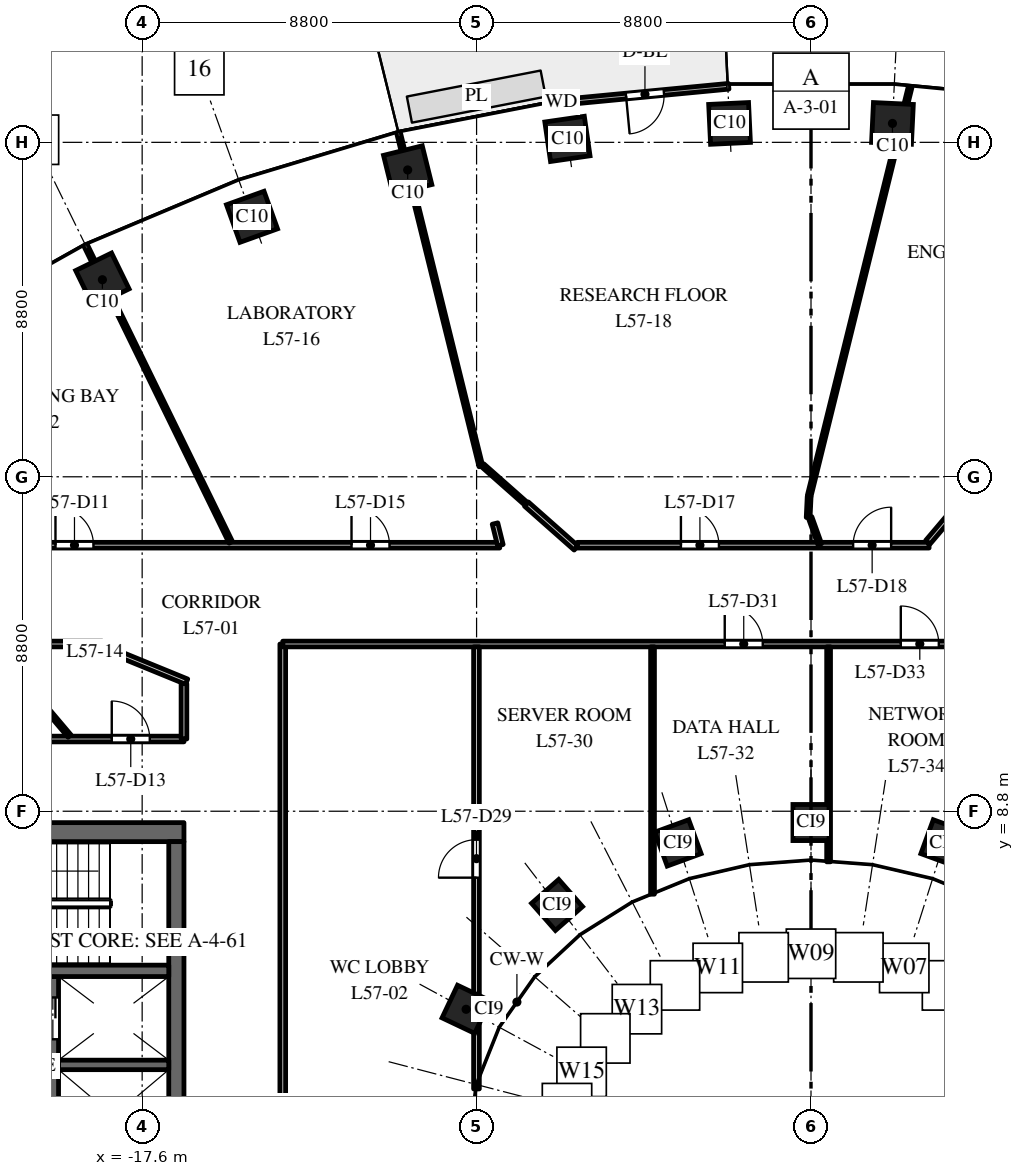
"""IFC4 building model, lengths in metres.
Left out: names, types, materials, properties, quantities, classifications, styles, units other than length and angle.
Written with IfcOpenShell. Run it as: python <this file> out.ifc"""

import sys

from ifc_helpers import new_model, si_unit, direction, frame, frame_2d, origin, origin_2d, place, context, subcontext, project, spatial, rectangle, extrude, element, fill, save


model = new_model("IFC4")
c1 = context("Model", 3, precision=1e-05, world=origin(), true_north=direction((0.0, 1.0)))
c2 = subcontext(c1, "Body", "Model", "MODEL_VIEW")
j1 = project(units=[si_unit("LENGTHUNIT", "METRE"), si_unit("PLANEANGLEUNIT", "RADIAN")], contexts=[c1])
p1 = place(None, origin())
s1 = spatial("IfcSite", under=j1, at=p1, CompositionType="ELEMENT")
p2 = place(p1, origin())
s2 = spatial("IfcBuilding", under=s1, at=p2, CompositionType="ELEMENT")
p3 = place(p2, frame((0.0, 0.0, 269.5)))
s3 = spatial("IfcBuildingStorey", under=s2, at=p3, CompositionType="ELEMENT", Elevation=269.5)
for number, where, z_axis, x_axis in (
    (1, (2.143, 26.898, 0.0), (0.0, 0.0, 1.0), (-0.999, 0.048, 0.0)),
    (2, (-2.143, 26.898, 0.0), (0.0, 0.0, 1.0), (-0.999, -0.048, 0.0)),
    (3, (-6.409, 26.491, 0.0), (0.0, 0.0, 1.0), (-0.99, -0.143, 0.0)),
    (4, (-10.613, 25.674, 0.0), (0.0, 0.0, 1.0), (-0.971, -0.24, 0.0)),
    (5, (-14.709, 24.441, 0.0), (0.0, 0.0, 1.0), (-0.941, -0.338, 0.0)),
    (6, (-18.646, 22.785, 0.0), (0.0, 0.0, 1.0), (-0.898, -0.439, 0.0)),
):
    element("IfcColumn", number, at=place(p3, frame(where, z_axis=z_axis, x_axis=x_axis)), inside=s3, PredefinedType="COLUMN", context=c2, shape_type="SweptSolid", body=[
        extrude(rectangle(XDim=1.05, YDim=1.05, at=origin_2d()), origin(), (0.0, 0.0, 1.0), 4.0),
    ])
for number, where, z_axis, x_axis in (
    (7, (3.501, 7.967, 0.0), (0.0, 0.0, 1.0), (-0.939, 0.344, 0.0)),
    (8, (0.0, 8.503, 0.0), (0.0, 0.0, 1.0), (-1.0, 0.0, 0.0)),
    (9, (-3.501, 7.967, 0.0), (0.0, 0.0, 1.0), (-0.939, -0.344, 0.0)),
    (10, (-6.682, 6.334, 0.0), (0.0, 0.0, 1.0), (-0.751, -0.66, 0.0)),
    (11, (-9.076, 3.588, 0.0), (0.0, 0.0, 1.0), (-0.429, -0.903, 0.0)),
):
    element("IfcColumn", number, at=place(p3, frame(where, z_axis=z_axis, x_axis=x_axis)), inside=s3, PredefinedType="COLUMN", context=c2, shape_type="SweptSolid", body=[
        extrude(rectangle(XDim=0.95, YDim=0.95, at=origin_2d()), origin(), (0.0, 0.0, 1.0), 4.0),
    ])
p4 = place(p3, frame((-16.5, 8.25, 0.0), z_axis=(0.0, 0.0, 1.0), x_axis=(-1.0, 0.0, 0.0)))
e12 = element("IfcWall", 12, at=p4, inside=s3, PredefinedType="SHEAR", context=c2, shape_type="SweptSolid", body=[
    extrude(rectangle(XDim=15.0, YDim=0.5, at=frame_2d((7.5, 0.0))), origin(), (0.0, 0.0, 1.0), 3.7),
])
p5 = place(p4, frame((6.9, 0.0, 0.0)))
e13 = element("IfcOpeningElement", 13, at=p5, cuts=e12, PredefinedType="OPENING", context=c2, shape_type="SweptSolid", body=[
    extrude(rectangle(XDim=1.2, YDim=2.1, at=frame_2d((0.6, 1.05))), frame((0.0, 0.26, 0.0), z_axis=(0.0, -1.0, 0.0), x_axis=(1.0, 0.0, 0.0)), (0.0, 0.0, 1.0), 0.52),
])
p6 = place(p4, frame((12.95, 0.0, 0.0)))
e14 = element("IfcOpeningElement", 14, at=p6, cuts=e12, PredefinedType="OPENING", context=c2, shape_type="SweptSolid", body=[
    extrude(rectangle(XDim=0.9, YDim=2.1, at=frame_2d((0.45, 1.05))), frame((0.0, 0.26, 0.0), z_axis=(0.0, -1.0, 0.0), x_axis=(1.0, 0.0, 0.0)), (0.0, 0.0, 1.0), 0.52),
])
p7 = place(p3, frame((-19.95, -4.45, 0.0), z_axis=(0.0, 0.0, 1.0), x_axis=(0.0, 1.0, 0.0)))
e15 = element("IfcWall", 15, at=p7, inside=s3, PredefinedType="SHEAR", context=c2, shape_type="SweptSolid", body=[
    extrude(rectangle(XDim=8.9, YDim=0.3, at=frame_2d((4.45, 0.0))), origin(), (0.0, 0.0, 1.0), 3.7),
])
p8 = place(p7, frame((0.775, 0.0, 0.0)))
e16 = element("IfcOpeningElement", 16, at=p8, cuts=e15, PredefinedType="OPENING", context=c2, shape_type="SweptSolid", body=[
    extrude(rectangle(XDim=1.2, YDim=2.1, at=frame_2d((0.6, 1.05))), frame((0.0, 0.16, 0.0), z_axis=(0.0, -1.0, 0.0), x_axis=(1.0, 0.0, 0.0)), (0.0, 0.0, 1.0), 0.32),
])
p9 = place(p7, frame((7.25, 0.0, 0.0)))
e17 = element("IfcOpeningElement", 17, at=p9, cuts=e15, PredefinedType="OPENING", context=c2, shape_type="SweptSolid", body=[
    extrude(rectangle(XDim=1.1, YDim=2.1, at=frame_2d((0.55, 1.05))), frame((0.0, 0.16, 0.0), z_axis=(0.0, -1.0, 0.0), x_axis=(1.0, 0.0, 0.0)), (0.0, 0.0, 1.0), 0.32),
])
p10 = place(p3, frame((-16.7, -8.0, 0.0), z_axis=(0.0, 0.0, 1.0), x_axis=(0.0, 1.0, 0.0)))
e18 = element("IfcWall", 18, at=p10, inside=s3, PredefinedType="SHEAR", context=c2, shape_type="SweptSolid", body=[
    extrude(rectangle(XDim=16.0, YDim=0.4, at=frame_2d((8.0, 0.0))), origin(), (0.0, 0.0, 1.0), 3.7),
])
p11 = place(p3, frame((-16.9, 2.125, 0.0), z_axis=(0.0, 0.0, 1.0), x_axis=(-1.0, 0.0, 0.0)))
e19 = element("IfcWall", 19, at=p11, inside=s3, PredefinedType="SHEAR", context=c2, shape_type="SweptSolid", body=[
    extrude(rectangle(XDim=2.9, YDim=0.25, at=frame_2d((1.45, 0.0))), origin(), (0.0, 0.0, 1.0), 3.7),
])
p12 = place(p3, frame((-16.9, 4.6, 0.0), z_axis=(0.0, 0.0, 1.0), x_axis=(-1.0, 0.0, 0.0)))
e20 = element("IfcWall", 20, at=p12, inside=s3, PredefinedType="SHEAR", context=c2, shape_type="SweptSolid", body=[
    extrude(rectangle(XDim=6.18, YDim=0.3, at=frame_2d((3.09, 0.0))), origin(), (0.0, 0.0, 1.0), 3.7),
])
p13 = place(p12, frame((4.9, 0.0, 0.0)))
e21 = element("IfcOpeningElement", 21, at=p13, cuts=e20, PredefinedType="OPENING", context=c2, shape_type="SweptSolid", body=[
    extrude(rectangle(XDim=1.1, YDim=2.1, at=frame_2d((0.55, 1.05))), frame((0.0, 0.16, 0.0), z_axis=(0.0, -1.0, 0.0), x_axis=(1.0, 0.0, 0.0)), (0.0, 0.0, 1.0), 0.32),
])
p14 = place(p3, frame((-2.166, 27.875, 0.0), z_axis=(0.0, 0.0, 1.0), x_axis=(-0.995473879823, -0.095035543824, 0.0)))
e22 = element("IfcWall", 22, at=p14, inside=s3, PredefinedType="STANDARD", context=c2, shape_type="SweptSolid", body=[
    extrude(rectangle(XDim=4.426, YDim=0.15, at=frame_2d((2.213, 0.0))), origin(), (0.0, 0.0, 1.0), 3.7),
])
p15 = place(p14, frame((1.713, 0.0, 0.0)))
e23 = element("IfcOpeningElement", 23, at=p15, cuts=e22, PredefinedType="OPENING", context=c2, shape_type="SweptSolid", body=[
    extrude(rectangle(XDim=1.0, YDim=2.4, at=frame_2d((0.5, 1.2))), frame((0.0, 0.085, 0.0), z_axis=(0.0, -1.0, 0.0), x_axis=(1.0, 0.0, 0.0)), (0.0, 0.0, 1.0), 0.17),
])
p16 = place(p3, frame((-31.5, 10.7, 0.0), z_axis=(0.0, 0.0, 1.0), x_axis=(1.0, 0.0, 0.0)))
e24 = element("IfcWall", 24, at=p16, inside=s3, PredefinedType="PARTITIONING", context=c2, shape_type="SweptSolid", body=[
    extrude(rectangle(XDim=15.0, YDim=0.15, at=frame_2d((7.5, 0.0))), origin(), (0.0, 0.0, 1.0), 3.1),
])
p17 = place(p16, frame((6.405, 0.0, 0.0)))
e25 = element("IfcOpeningElement", 25, at=p17, cuts=e24, PredefinedType="OPENING", context=c2, shape_type="SweptSolid", body=[
    extrude(rectangle(XDim=1.0, YDim=2.1, at=frame_2d((0.5, 1.05))), frame((0.0, 0.085, 0.0), z_axis=(0.0, -1.0, 0.0), x_axis=(1.0, 0.0, 0.0)), (0.0, 0.0, 1.0), 0.17),
])
p18 = place(p16, frame((13.1, 0.0, 0.0)))
e26 = element("IfcOpeningElement", 26, at=p18, cuts=e24, PredefinedType="OPENING", context=c2, shape_type="SweptSolid", body=[
    extrude(rectangle(XDim=1.0, YDim=2.1, at=frame_2d((0.5, 1.05))), frame((0.0, 0.085, 0.0), z_axis=(0.0, -1.0, 0.0), x_axis=(1.0, 0.0, 0.0)), (0.0, 0.0, 1.0), 0.17),
])
p19 = place(p3, frame((-28.0, 13.2, 0.0), z_axis=(0.0, 0.0, 1.0), x_axis=(1.0, 0.0, 0.0)))
e27 = element("IfcWall", 27, at=p19, inside=s3, PredefinedType="PARTITIONING", context=c2, shape_type="SweptSolid", body=[
    extrude(rectangle(XDim=9.347, YDim=0.15, at=frame_2d((4.673, 0.0))), origin(), (0.0, 0.0, 1.0), 2.75),
])
p20 = place(p3, frame((-28.0, 15.8, 0.0), z_axis=(0.0, 0.0, 1.0), x_axis=(1.0, 0.0, 0.0)))
e28 = element("IfcWall", 28, at=p20, inside=s3, PredefinedType="PARTITIONING", context=c2, shape_type="SweptSolid", body=[
    extrude(rectangle(XDim=19.809, YDim=0.15, at=frame_2d((9.905, 0.0))), origin(), (0.0, 0.0, 1.0), 2.75),
])
p21 = place(p20, frame((8.119, 0.0, 0.0)))
e29 = element("IfcOpeningElement", 29, at=p21, cuts=e28, PredefinedType="OPENING", context=c2, shape_type="SweptSolid", body=[
    extrude(rectangle(XDim=1.0, YDim=2.1, at=frame_2d((0.5, 1.05))), frame((0.0, 0.085, 0.0), z_axis=(0.0, -1.0, 0.0), x_axis=(1.0, 0.0, 0.0)), (0.0, 0.0, 1.0), 0.17),
])
p22 = place(p20, frame((15.909, 0.0, 0.0)))
e30 = element("IfcOpeningElement", 30, at=p22, cuts=e28, PredefinedType="OPENING", context=c2, shape_type="SweptSolid", body=[
    extrude(rectangle(XDim=1.0, YDim=2.1, at=frame_2d((0.5, 1.05))), frame((0.0, 0.085, 0.0), z_axis=(0.0, -1.0, 0.0), x_axis=(1.0, 0.0, 0.0)), (0.0, 0.0, 1.0), 0.17),
])
p23 = place(p3, frame((-21.499, 13.125, 0.0), z_axis=(0.0, 0.0, 1.0), x_axis=(0.646354899778, -0.763036921474, 0.0)))
e31 = element("IfcWall", 31, at=p23, inside=s3, PredefinedType="PARTITIONING", context=c2, shape_type="SweptSolid", body=[
    extrude(rectangle(XDim=3.076, YDim=0.1, at=frame_2d((1.538, 0.0))), origin(), (0.0, 0.0, 1.0), 3.7),
])
p24 = place(p3, frame((-19.086, 23.685, 0.0), z_axis=(0.0, 0.0, 1.0), x_axis=(0.439174872977, -0.898401597809, 0.0)))
e32 = element("IfcWall", 32, at=p24, inside=s3, PredefinedType="PARTITIONING", context=c2, shape_type="SweptSolid", body=[
    extrude(rectangle(XDim=8.693, YDim=0.1, at=frame_2d((4.347, 0.0))), origin(), (0.0, 0.0, 1.0), 2.85),
])
p25 = place(p3, frame((-18.664, 13.123, 0.0), z_axis=(0.0, 0.0, 1.0), x_axis=(0.925590432986, -0.378526551731, 0.0)))
e33 = element("IfcWall", 33, at=p25, inside=s3, PredefinedType="PARTITIONING", context=c2, shape_type="SweptSolid", body=[
    extrude(rectangle(XDim=2.415, YDim=0.15, at=frame_2d((1.208, 0.0))), origin(), (0.0, 0.0, 1.0), 2.75),
])
p26 = place(p3, frame((-16.5, 10.7, 0.0), z_axis=(0.0, 0.0, 1.0), x_axis=(0.0, 1.0, 0.0)))
e34 = element("IfcWall", 34, at=p26, inside=s3, PredefinedType="PARTITIONING", context=c2, shape_type="SweptSolid", body=[
    extrude(rectangle(XDim=1.457, YDim=0.15, at=frame_2d((0.729, 0.0))), origin(), (0.0, 0.0, 1.0), 2.75),
])
p27 = place(p3, frame((-13.9, -13.2, 0.0), z_axis=(0.0, 0.0, 1.0), x_axis=(0.0, 1.0, 0.0)))
e35 = element("IfcWall", 35, at=p27, inside=s3, PredefinedType="PARTITIONING", context=c2, shape_type="SweptSolid", body=[
    extrude(rectangle(XDim=26.4, YDim=0.15, at=frame_2d((13.2, 0.0))), origin(), (0.0, 0.0, 1.0), 2.75),
])
p28 = place(p27, frame((12.65, 0.0, 0.0)))
e36 = element("IfcOpeningElement", 36, at=p28, cuts=e35, PredefinedType="OPENING", context=c2, shape_type="SweptSolid", body=[
    extrude(rectangle(XDim=1.0, YDim=2.1, at=frame_2d((0.5, 1.05))), frame((0.0, 0.085, 0.0), z_axis=(0.0, -1.0, 0.0), x_axis=(1.0, 0.0, 0.0)), (0.0, 0.0, 1.0), 0.17),
])
p29 = place(p3, frame((-13.9, 13.2, 0.0), z_axis=(0.0, 0.0, 1.0), x_axis=(1.0, 0.0, 0.0)))
e37 = element("IfcWall", 37, at=p29, inside=s3, PredefinedType="PARTITIONING", context=c2, shape_type="SweptSolid", body=[
    extrude(rectangle(XDim=27.8, YDim=0.15, at=frame_2d((13.9, 0.0))), origin(), (0.0, 0.0, 1.0), 2.85),
])
p30 = place(p29, frame((11.63, 0.0, 0.0)))
e38 = element("IfcOpeningElement", 38, at=p30, cuts=e37, PredefinedType="OPENING", context=c2, shape_type="SweptSolid", body=[
    extrude(rectangle(XDim=1.0, YDim=2.1, at=frame_2d((0.5, 1.05))), frame((0.0, 0.085, 0.0), z_axis=(0.0, -1.0, 0.0), x_axis=(1.0, 0.0, 0.0)), (0.0, 0.0, 1.0), 0.17),
])
p31 = place(p29, frame((16.263, 0.0, 0.0)))
e39 = element("IfcOpeningElement", 39, at=p31, cuts=e37, PredefinedType="OPENING", context=c2, shape_type="SweptSolid", body=[
    extrude(rectangle(XDim=1.0, YDim=2.1, at=frame_2d((0.5, 1.05))), frame((0.0, 0.085, 0.0), z_axis=(0.0, -1.0, 0.0), x_axis=(1.0, 0.0, 0.0)), (0.0, 0.0, 1.0), 0.17),
])
p32 = place(p29, frame((20.897, 0.0, 0.0)))
e40 = element("IfcOpeningElement", 40, at=p32, cuts=e37, PredefinedType="OPENING", context=c2, shape_type="SweptSolid", body=[
    extrude(rectangle(XDim=1.0, YDim=2.1, at=frame_2d((0.5, 1.05))), frame((0.0, 0.085, 0.0), z_axis=(0.0, -1.0, 0.0), x_axis=(1.0, 0.0, 0.0)), (0.0, 0.0, 1.0), 0.17),
])
p33 = place(p3, frame((-10.853, 26.646, 0.0), z_axis=(0.0, 0.0, 1.0), x_axis=(0.239774810524, -0.970828532872, 0.0)))
e41 = element("IfcWall", 41, at=p33, inside=s3, PredefinedType="PARTITIONING", context=c2, shape_type="SweptSolid", body=[
    extrude(rectangle(XDim=9.033, YDim=0.1, at=frame_2d((4.517, 0.0))), origin(), (0.0, 0.0, 1.0), 2.85),
])
p34 = place(p3, frame((-8.803, 1.493, 0.0), z_axis=(0.0, 0.0, 1.0), x_axis=(0.0, 1.0, 0.0)))
e42 = element("IfcWall", 42, at=p34, inside=s3, PredefinedType="PARTITIONING", context=c2, shape_type="SweptSolid", body=[
    extrude(rectangle(XDim=11.632, YDim=0.15, at=frame_2d((5.816, 0.0))), origin(), (0.0, 0.0, 1.0), 2.75),
])
p35 = place(p34, frame((5.559, 0.0, 0.0)))
e43 = element("IfcOpeningElement", 43, at=p35, cuts=e42, PredefinedType="OPENING", context=c2, shape_type="SweptSolid", body=[
    extrude(rectangle(XDim=1.0, YDim=2.1, at=frame_2d((0.5, 1.05))), frame((0.0, 0.085, 0.0), z_axis=(0.0, -1.0, 0.0), x_axis=(1.0, 0.0, 0.0)), (0.0, 0.0, 1.0), 0.17),
])
p36 = place(p3, frame((-8.642, 17.903, 0.0), z_axis=(0.0, 0.0, 1.0), x_axis=(0.748963294947, -0.662611487089, 0.0)))
e44 = element("IfcWall", 44, at=p36, inside=s3, PredefinedType="PARTITIONING", context=c2, shape_type="SweptSolid", body=[
    extrude(rectangle(XDim=1.541, YDim=0.1, at=frame_2d((0.771, 0.0))), origin(), (0.0, 0.0, 1.0), 3.7),
])
p37 = place(p3, frame((-8.315, 16.37, 0.0), z_axis=(0.0, 0.0, 1.0), x_axis=(0.239893428325, -0.97079922901, 0.0)))
e45 = element("IfcWall", 45, at=p37, inside=s3, PredefinedType="PARTITIONING", context=c2, shape_type="SweptSolid", body=[
    extrude(rectangle(XDim=0.587, YDim=0.15, at=frame_2d((0.293, 0.0))), origin(), (0.0, 0.0, 1.0), 3.7),
])
p38 = place(p3, frame((-7.488, 16.882, 0.0), z_axis=(0.0, 0.0, 1.0), x_axis=(0.749084830903, -0.662474087124, 0.0)))
e46 = element("IfcWall", 46, at=p38, inside=s3, PredefinedType="PARTITIONING", context=c2, shape_type="SweptSolid", body=[
    extrude(rectangle(XDim=1.742, YDim=0.15, at=frame_2d((0.871, 0.0))), origin(), (0.0, 0.0, 1.0), 2.85),
])
p39 = place(p3, frame((-6.152, 15.8, 0.0), z_axis=(0.0, 0.0, 1.0), x_axis=(1.0, 0.0, 0.0)))
e47 = element("IfcWall", 47, at=p39, inside=s3, PredefinedType="PARTITIONING", context=c2, shape_type="SweptSolid", body=[
    extrude(rectangle(XDim=9.259, YDim=0.15, at=frame_2d((4.629, 0.0))), origin(), (0.0, 0.0, 1.0), 2.85),
])
p40 = place(p39, frame((2.729, 0.0, 0.0)))
e48 = element("IfcOpeningElement", 48, at=p40, cuts=e47, PredefinedType="OPENING", context=c2, shape_type="SweptSolid", body=[
    extrude(rectangle(XDim=1.0, YDim=2.1, at=frame_2d((0.5, 1.05))), frame((0.0, 0.085, 0.0), z_axis=(0.0, -1.0, 0.0), x_axis=(1.0, 0.0, 0.0)), (0.0, 0.0, 1.0), 0.17),
])
p41 = place(p39, frame((7.261, 0.0, 0.0)))
e49 = element("IfcOpeningElement", 49, at=p41, cuts=e47, PredefinedType="OPENING", context=c2, shape_type="SweptSolid", body=[
    extrude(rectangle(XDim=1.0, YDim=2.1, at=frame_2d((0.5, 1.05))), frame((0.0, 0.085, 0.0), z_axis=(0.0, -1.0, 0.0), x_axis=(1.0, 0.0, 0.0)), (0.0, 0.0, 1.0), 0.17),
])
p42 = place(p3, frame((-4.17, 6.617, 0.0), z_axis=(0.0, 0.0, 1.0), x_axis=(0.0, 1.0, 0.0)))
e50 = element("IfcWall", 50, at=p42, inside=s3, PredefinedType="PARTITIONING", context=c2, shape_type="SweptSolid", body=[
    extrude(rectangle(XDim=6.508, YDim=0.1, at=frame_2d((3.254, 0.0))), origin(), (0.0, 0.0, 1.0), 2.85),
])
p43 = place(p3, frame((-0.075, 16.528, 0.0), z_axis=(0.0, 0.0, 1.0), x_axis=(0.047184463658, 0.998886192912, 0.0)))
e51 = element("IfcWall", 51, at=p43, inside=s3, PredefinedType="PARTITIONING", context=c2, shape_type="SweptSolid", body=[
    extrude(rectangle(XDim=0.549, YDim=0.1, at=frame_2d((0.274, 0.0))), origin(), (0.0, 0.0, 1.0), 3.7),
])
p44 = place(p3, frame((-0.025, 16.535, 0.0), z_axis=(0.0, 0.0, 1.0), x_axis=(0.338627931753, -0.940920359986, 0.0)))
e52 = element("IfcWall", 52, at=p44, inside=s3, PredefinedType="PARTITIONING", context=c2, shape_type="SweptSolid", body=[
    extrude(rectangle(XDim=0.756, YDim=0.1, at=frame_2d((0.378, 0.0))), origin(), (0.0, 0.0, 1.0), 3.7),
])
p45 = place(p3, frame((-0.048, 17.097, 0.0), z_axis=(0.0, 0.0, 1.0), x_axis=(0.23971007337, 0.970844519336, 0.0)))
e53 = element("IfcWall", 53, at=p45, inside=s3, PredefinedType="PARTITIONING", context=c2, shape_type="SweptSolid", body=[
    extrude(rectangle(XDim=11.084, YDim=0.1, at=frame_2d((5.542, 0.0))), origin(), (0.0, 0.0, 1.0), 3.0),
])
p46 = place(p3, frame((0.463, 7.469, 0.0), z_axis=(0.0, 0.0, 1.0), x_axis=(0.0, 1.0, 0.0)))
e54 = element("IfcWall", 54, at=p46, inside=s3, PredefinedType="PARTITIONING", context=c2, shape_type="SweptSolid", body=[
    extrude(rectangle(XDim=5.656, YDim=0.1, at=frame_2d((2.828, 0.0))), origin(), (0.0, 0.0, 1.0), 3.0),
])
p47 = place(p3, frame((3.075, 15.878, 0.0), z_axis=(0.0, 0.0, 1.0), x_axis=(0.646427152644, 0.76297571149, 0.0)))
e55 = element("IfcWall", 55, at=p47, inside=s3, PredefinedType="PARTITIONING", context=c2, shape_type="SweptSolid", body=[
    extrude(rectangle(XDim=1.579, YDim=0.15, at=frame_2d((0.79, 0.0))), origin(), (0.0, 0.0, 1.0), 2.85),
])
p48 = place(p9, origin())
e56 = element("IfcDoor", 56, at=p48, inside=s3, OperationType="DOUBLE_DOOR_SLIDING", PredefinedType="DOOR", context=c2, shape_type="SweptSolid", body=[
    extrude(rectangle(XDim=1.1, YDim=2.1, at=frame_2d((0.55, 1.05))), frame((0.0, 0.025, 0.0), z_axis=(0.0, -1.0, 0.0), x_axis=(1.0, 0.0, 0.0)), (0.0, 0.0, 1.0), 0.05),
])
fill(e17, e56)
p49 = place(p15, origin())
e57 = element("IfcDoor", 57, at=p49, inside=s3, OperationType="SINGLE_SWING_RIGHT", PredefinedType="DOOR", context=c2, shape_type="SweptSolid", body=[
    extrude(rectangle(XDim=1.0, YDim=2.4, at=frame_2d((0.5, 1.2))), frame((0.0, 0.025, 0.0), z_axis=(0.0, -1.0, 0.0), x_axis=(1.0, 0.0, 0.0)), (0.0, 0.0, 1.0), 0.05),
])
fill(e23, e57)
p50 = place(p21, origin())
e58 = element("IfcDoor", 58, at=p50, inside=s3, OperationType="SINGLE_SWING_LEFT", PredefinedType="DOOR", context=c2, shape_type="SweptSolid", body=[
    extrude(rectangle(XDim=1.0, YDim=2.1, at=frame_2d((0.5, 1.05))), frame((0.0, 0.025, 0.0), z_axis=(0.0, -1.0, 0.0), x_axis=(1.0, 0.0, 0.0)), (0.0, 0.0, 1.0), 0.05),
])
fill(e29, e58)
p51 = place(p18, origin())
e59 = element("IfcDoor", 59, at=p51, inside=s3, OperationType="SINGLE_SWING_LEFT", PredefinedType="DOOR", context=c2, shape_type="SweptSolid", body=[
    extrude(rectangle(XDim=1.0, YDim=2.1, at=frame_2d((0.5, 1.05))), frame((0.0, 0.025, 0.0), z_axis=(0.0, -1.0, 0.0), x_axis=(1.0, 0.0, 0.0)), (0.0, 0.0, 1.0), 0.05),
])
fill(e26, e59)
p52 = place(p22, origin())
e60 = element("IfcDoor", 60, at=p52, inside=s3, OperationType="SINGLE_SWING_LEFT", PredefinedType="DOOR", context=c2, shape_type="SweptSolid", body=[
    extrude(rectangle(XDim=1.0, YDim=2.1, at=frame_2d((0.5, 1.05))), frame((0.0, 0.025, 0.0), z_axis=(0.0, -1.0, 0.0), x_axis=(1.0, 0.0, 0.0)), (0.0, 0.0, 1.0), 0.05),
])
fill(e30, e60)
p53 = place(p40, origin())
e61 = element("IfcDoor", 61, at=p53, inside=s3, OperationType="SINGLE_SWING_LEFT", PredefinedType="DOOR", context=c2, shape_type="SweptSolid", body=[
    extrude(rectangle(XDim=1.0, YDim=2.1, at=frame_2d((0.5, 1.05))), frame((0.0, 0.025, 0.0), z_axis=(0.0, -1.0, 0.0), x_axis=(1.0, 0.0, 0.0)), (0.0, 0.0, 1.0), 0.05),
])
fill(e48, e61)
p54 = place(p41, origin())
e62 = element("IfcDoor", 62, at=p54, inside=s3, OperationType="SINGLE_SWING_RIGHT", PredefinedType="DOOR", context=c2, shape_type="SweptSolid", body=[
    extrude(rectangle(XDim=1.0, YDim=2.1, at=frame_2d((0.5, 1.05))), frame((0.0, 0.025, 0.0), z_axis=(0.0, -1.0, 0.0), x_axis=(1.0, 0.0, 0.0)), (0.0, 0.0, 1.0), 0.05),
])
fill(e49, e62)
p55 = place(p35, origin())
e63 = element("IfcDoor", 63, at=p55, inside=s3, OperationType="SINGLE_SWING_LEFT", PredefinedType="DOOR", context=c2, shape_type="SweptSolid", body=[
    extrude(rectangle(XDim=1.0, YDim=2.1, at=frame_2d((0.5, 1.05))), frame((0.0, 0.025, 0.0), z_axis=(0.0, -1.0, 0.0), x_axis=(1.0, 0.0, 0.0)), (0.0, 0.0, 1.0), 0.05),
])
fill(e43, e63)
p56 = place(p30, origin())
e64 = element("IfcDoor", 64, at=p56, inside=s3, OperationType="SINGLE_SWING_LEFT", PredefinedType="DOOR", context=c2, shape_type="SweptSolid", body=[
    extrude(rectangle(XDim=1.0, YDim=2.1, at=frame_2d((0.5, 1.05))), frame((0.0, 0.025, 0.0), z_axis=(0.0, -1.0, 0.0), x_axis=(1.0, 0.0, 0.0)), (0.0, 0.0, 1.0), 0.05),
])
fill(e38, e64)
p57 = place(p31, origin())
e65 = element("IfcDoor", 65, at=p57, inside=s3, OperationType="SINGLE_SWING_LEFT", PredefinedType="DOOR", context=c2, shape_type="SweptSolid", body=[
    extrude(rectangle(XDim=1.0, YDim=2.1, at=frame_2d((0.5, 1.05))), frame((0.0, 0.025, 0.0), z_axis=(0.0, -1.0, 0.0), x_axis=(1.0, 0.0, 0.0)), (0.0, 0.0, 1.0), 0.05),
])
fill(e39, e65)
save(model, sys.argv[1])
